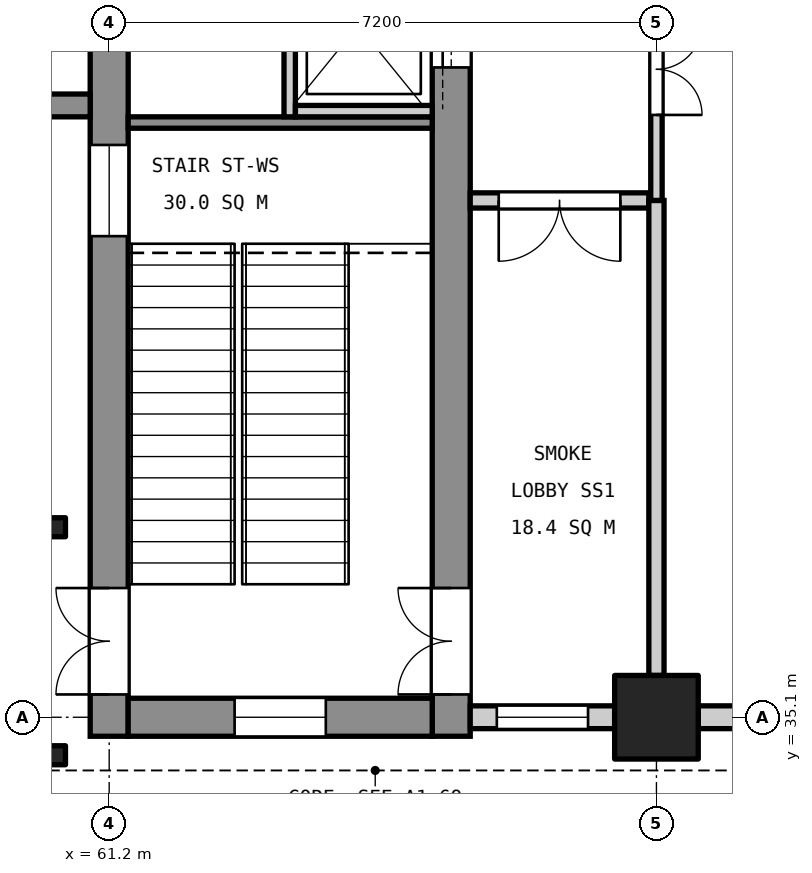
"""IFC4 building model, lengths in metres.
Left out: names, types, materials, properties, quantities, classifications, styles, units other than length and angle.
Written with IfcOpenShell. Run it as: python <this file> out.ifc"""

import sys

from ifc_helpers import new_model, si_unit, direction, frame, frame_2d, origin, origin_2d, place, context, subcontext, project, spatial, rectangle, i_section, extrude, element, fill, save


model = new_model("IFC4")
c1 = context("Model", 3, precision=1e-05, world=origin(), true_north=direction((0.0, 1.0)))
c2 = subcontext(c1, "Body", "Model", "MODEL_VIEW")
j1 = project(units=[si_unit("LENGTHUNIT", "METRE"), si_unit("PLANEANGLEUNIT", "RADIAN")], contexts=[c1])
p1 = place(None, origin())
s1 = spatial("IfcSite", under=j1, at=p1, CompositionType="ELEMENT")
p2 = place(p1, origin())
s2 = spatial("IfcBuilding", under=s1, at=p2, CompositionType="ELEMENT")
p3 = place(p2, origin())
s3 = spatial("IfcBuildingStorey", under=s2, at=p3, CompositionType="ELEMENT", Elevation=0.0)
p4 = place(p3, frame((68.4, 35.1, 0.0), z_axis=(0.0, 0.0, 1.0), x_axis=(1.0, 0.0, 0.0)))
e1 = element("IfcColumn", 1, at=p4, inside=s3, PredefinedType="COLUMN", context=c2, shape_type="SweptSolid", body=[
    extrude(rectangle(XDim=1.1, YDim=1.1, at=origin_2d()), origin(), (0.0, 0.0, 1.0), 6.0),
])
p5 = place(p3, frame((61.2, 34.85, 0.0), z_axis=(0.0, 0.0, 1.0), x_axis=(0.0, 1.0, 0.0)))
e2 = element("IfcWall", 2, at=p5, inside=s3, PredefinedType="SHEAR", context=c2, shape_type="SweptSolid", body=[
    extrude(rectangle(XDim=11.3, YDim=0.5, at=frame_2d((5.65, 0.0))), origin(), (0.0, 0.0, 1.0), 5.7),
])
p6 = place(p5, frame((0.55, 0.0, 0.0)))
e3 = element("IfcOpeningElement", 3, at=p6, cuts=e2, PredefinedType="OPENING", context=c2, shape_type="SweptSolid", body=[
    extrude(rectangle(XDim=1.4, YDim=2.1, at=frame_2d((0.7, 1.05))), frame((0.0, 0.26, 0.0), z_axis=(0.0, -1.0, 0.0), x_axis=(1.0, 0.0, 0.0)), (0.0, 0.0, 1.0), 0.52),
])
p7 = place(p5, frame((6.58, 0.0, 3.4)))
e4 = element("IfcOpeningElement", 4, at=p7, cuts=e2, PredefinedType="OPENING", context=c2, shape_type="SweptSolid", body=[
    extrude(rectangle(XDim=1.2, YDim=0.9, at=frame_2d((0.6, 0.45))), frame((0.0, 0.26, 0.0), z_axis=(0.0, -1.0, 0.0), x_axis=(1.0, 0.0, 0.0)), (0.0, 0.0, 1.0), 0.52),
])
p8 = place(p3, frame((65.7, 34.85, 0.0), z_axis=(0.0, 0.0, 1.0), x_axis=(0.0, 1.0, 0.0)))
e5 = element("IfcWall", 5, at=p8, inside=s3, PredefinedType="SHEAR", context=c2, shape_type="SweptSolid", body=[
    extrude(rectangle(XDim=11.3, YDim=0.5, at=frame_2d((5.65, 0.0))), origin(), (0.0, 0.0, 1.0), 5.7),
])
p9 = place(p8, frame((0.55, 0.0, 0.0)))
e6 = element("IfcOpeningElement", 6, at=p9, cuts=e5, PredefinedType="OPENING", context=c2, shape_type="SweptSolid", body=[
    extrude(rectangle(XDim=1.4, YDim=2.1, at=frame_2d((0.7, 1.05))), frame((0.0, 0.26, 0.0), z_axis=(0.0, -1.0, 0.0), x_axis=(1.0, 0.0, 0.0)), (0.0, 0.0, 1.0), 0.52),
])
p10 = place(p8, frame((8.8, 0.0, 0.0)))
e7 = element("IfcOpeningElement", 7, at=p10, cuts=e5, PredefinedType="OPENING", context=c2, shape_type="SweptSolid", body=[
    extrude(rectangle(XDim=1.1, YDim=2.1, at=frame_2d((0.55, 1.05))), frame((0.0, 0.26, 0.0), z_axis=(0.0, -1.0, 0.0), x_axis=(1.0, 0.0, 0.0)), (0.0, 0.0, 1.0), 0.52),
])
p11 = place(p3, frame((61.45, 35.1, 0.0), z_axis=(0.0, 0.0, 1.0), x_axis=(1.0, 0.0, 0.0)))
e8 = element("IfcWall", 8, at=p11, inside=s3, PredefinedType="SHEAR", context=c2, shape_type="SweptSolid", body=[
    extrude(rectangle(XDim=4.0, YDim=0.5, at=frame_2d((2.0, 0.0))), origin(), (0.0, 0.0, 1.0), 5.7),
])
p12 = place(p11, frame((1.4, 0.0, 3.4)))
e9 = element("IfcOpeningElement", 9, at=p12, cuts=e8, PredefinedType="OPENING", context=c2, shape_type="SweptSolid", body=[
    extrude(rectangle(XDim=1.2, YDim=0.9, at=frame_2d((0.6, 0.45))), frame((0.0, 0.26, 0.0), z_axis=(0.0, -1.0, 0.0), x_axis=(1.0, 0.0, 0.0)), (0.0, 0.0, 1.0), 0.52),
])
p13 = place(p3, frame((60.95, 43.15, 0.0), z_axis=(0.0, 0.0, 1.0), x_axis=(-1.0, 0.0, 0.0)))
e10 = element("IfcWall", 10, at=p13, inside=s3, PredefinedType="SHEAR", context=c2, shape_type="SweptSolid", body=[
    extrude(rectangle(XDim=1.25, YDim=0.3, at=frame_2d((0.625, 0.0))), origin(), (0.0, 0.0, 1.0), 6.0),
])
for number, where, z_axis, x_axis in (
    (11, (60.5, 34.6, 0.0), (0.0, 0.0, 1.0), (1.0, 0.0, 0.0)),
    (12, (60.5, 37.6, 0.0), (0.0, 0.0, 1.0), (1.0, 0.0, 0.0)),
):
    element("IfcColumn", number, at=place(p3, frame(where, z_axis=z_axis, x_axis=x_axis)), inside=s3, PredefinedType="COLUMN", context=c2, shape_type="SweptSolid", body=[
        extrude(i_section(OverallWidth=0.25, OverallDepth=0.25, WebThickness=0.009, FlangeThickness=0.014, FilletRadius=0.016, at=origin_2d()), origin(), (0.0, 0.0, 1.0), 4.8),
    ])
p14 = place(p3, frame((61.45, 42.925, 0.0), z_axis=(0.0, 0.0, 1.0), x_axis=(1.0, 0.0, 0.0)))
e13 = element("IfcWall", 13, at=p14, inside=s3, PredefinedType="SOLIDWALL", context=c2, shape_type="SweptSolid", body=[
    extrude(rectangle(XDim=4.0, YDim=0.15, at=frame_2d((2.0, 0.0))), origin(), (0.0, 0.0, 1.0), 5.7),
])
p15 = place(p3, frame((63.575, 43.0, 0.0), z_axis=(0.0, 0.0, 1.0), x_axis=(0.0, 1.0, 0.0)))
e14 = element("IfcWall", 14, at=p15, inside=s3, PredefinedType="SOLIDWALL", context=c2, shape_type="SweptSolid", body=[
    extrude(rectangle(XDim=2.65, YDim=0.15, at=frame_2d((1.325, 0.0))), origin(), (0.0, 0.0, 1.0), 6.0),
])
p16 = place(p3, frame((63.65, 43.075, 0.0), z_axis=(0.0, 0.0, 1.0), x_axis=(1.0, 0.0, 0.0)))
e15 = element("IfcWall", 15, at=p16, inside=s3, PredefinedType="SOLIDWALL", context=c2, shape_type="SweptSolid", body=[
    extrude(rectangle(XDim=1.8, YDim=0.15, at=frame_2d((0.9, 0.0))), origin(), (0.0, 0.0, 1.0), 6.0),
])
p17 = place(p3, frame((65.95, 35.1, 0.0), z_axis=(0.0, 0.0, 1.0), x_axis=(1.0, 0.0, 0.0)))
e16 = element("IfcWall", 16, at=p17, inside=s3, PredefinedType="STANDARD", context=c2, shape_type="SweptSolid", body=[
    extrude(rectangle(XDim=1.9, YDim=0.3, at=frame_2d((0.95, 0.0))), origin(), (0.0, 0.0, 1.0), 4.9),
])
p18 = place(p17, frame((0.35, 0.0, 0.9)))
e17 = element("IfcOpeningElement", 17, at=p18, cuts=e16, PredefinedType="OPENING", context=c2, shape_type="SweptSolid", body=[
    extrude(rectangle(XDim=1.2, YDim=2.4, at=frame_2d((0.6, 1.2))), frame((0.0, 0.16, 0.0), z_axis=(0.0, -1.0, 0.0), x_axis=(1.0, 0.0, 0.0)), (0.0, 0.0, 1.0), 0.32),
])
p19 = place(p3, frame((68.95, 35.1, 0.0), z_axis=(0.0, 0.0, 1.0), x_axis=(1.0, 0.0, 0.0)))
e18 = element("IfcWall", 18, at=p19, inside=s3, PredefinedType="STANDARD", context=c2, shape_type="SweptSolid", body=[
    extrude(rectangle(XDim=9.7, YDim=0.3, at=frame_2d((4.85, 0.0))), origin(), (0.0, 0.0, 1.0), 4.9),
])
p20 = place(p19, frame((0.625, 0.0, 0.9)))
e19 = element("IfcOpeningElement", 19, at=p20, cuts=e18, PredefinedType="OPENING", context=c2, shape_type="SweptSolid", body=[
    extrude(rectangle(XDim=1.8, YDim=3.0, at=frame_2d((0.9, 1.5))), frame((0.0, 0.16, 0.0), z_axis=(0.0, -1.0, 0.0), x_axis=(1.0, 0.0, 0.0)), (0.0, 0.0, 1.0), 0.32),
])
p21 = place(p19, frame((3.95, 0.0, 0.9)))
e20 = element("IfcOpeningElement", 20, at=p21, cuts=e18, PredefinedType="OPENING", context=c2, shape_type="SweptSolid", body=[
    extrude(rectangle(XDim=1.8, YDim=3.0, at=frame_2d((0.9, 1.5))), frame((0.0, 0.16, 0.0), z_axis=(0.0, -1.0, 0.0), x_axis=(1.0, 0.0, 0.0)), (0.0, 0.0, 1.0), 0.32),
])
p22 = place(p19, frame((7.275, 0.0, 0.9)))
e21 = element("IfcOpeningElement", 21, at=p22, cuts=e18, PredefinedType="OPENING", context=c2, shape_type="SweptSolid", body=[
    extrude(rectangle(XDim=1.8, YDim=3.0, at=frame_2d((0.9, 1.5))), frame((0.0, 0.16, 0.0), z_axis=(0.0, -1.0, 0.0), x_axis=(1.0, 0.0, 0.0)), (0.0, 0.0, 1.0), 0.32),
])
p23 = place(p3, frame((65.95, 41.9, 0.0), z_axis=(0.0, 0.0, 1.0), x_axis=(1.0, 0.0, 0.0)))
e22 = element("IfcWall", 22, at=p23, inside=s3, PredefinedType="PARTITIONING", context=c2, shape_type="SweptSolid", body=[
    extrude(rectangle(XDim=2.35, YDim=0.2, at=frame_2d((1.175, 0.0))), origin(), (0.0, 0.0, 1.0), 4.6),
])
p24 = place(p23, frame((0.375, 0.0, 0.0)))
e23 = element("IfcOpeningElement", 23, at=p24, cuts=e22, PredefinedType="OPENING", context=c2, shape_type="SweptSolid", body=[
    extrude(rectangle(XDim=1.6, YDim=2.1, at=frame_2d((0.8, 1.05))), frame((0.0, 0.11, 0.0), z_axis=(0.0, -1.0, 0.0), x_axis=(1.0, 0.0, 0.0)), (0.0, 0.0, 1.0), 0.22),
])
p25 = place(p3, frame((68.4, 35.65, 0.0), z_axis=(0.0, 0.0, 1.0), x_axis=(0.0, 1.0, 0.0)))
e24 = element("IfcWall", 24, at=p25, inside=s3, PredefinedType="PARTITIONING", context=c2, shape_type="SweptSolid", body=[
    extrude(rectangle(XDim=6.25, YDim=0.2, at=frame_2d((3.125, 0.0))), origin(), (0.0, 0.0, 1.0), 4.6),
])
p26 = place(p3, frame((68.4, 41.9, 0.0), z_axis=(0.0, 0.0, 1.0), x_axis=(0.0, 1.0, 0.0)))
e25 = element("IfcWall", 25, at=p26, inside=s3, PredefinedType="PARTITIONING", context=c2, shape_type="SweptSolid", body=[
    extrude(rectangle(XDim=3.45, YDim=0.15, at=frame_2d((1.725, 0.0))), origin(), (0.0, 0.0, 1.0), 4.6),
])
p27 = place(p26, frame((1.125, 0.0, 0.0)))
e26 = element("IfcOpeningElement", 26, at=p27, cuts=e25, PredefinedType="OPENING", context=c2, shape_type="SweptSolid", body=[
    extrude(rectangle(XDim=1.2, YDim=2.1, at=frame_2d((0.6, 1.05))), frame((0.0, 0.085, 0.0), z_axis=(0.0, -1.0, 0.0), x_axis=(1.0, 0.0, 0.0)), (0.0, 0.0, 1.0), 0.17),
])
p28 = place(p9, origin())
e27 = element("IfcDoor", 27, at=p28, inside=s3, OperationType="DOUBLE_DOOR_SINGLE_SWING", PredefinedType="DOOR", context=c2, shape_type="SweptSolid", body=[
    extrude(rectangle(XDim=1.4, YDim=2.1, at=frame_2d((0.7, 1.05))), frame((0.0, 0.025, 0.0), z_axis=(0.0, -1.0, 0.0), x_axis=(1.0, 0.0, 0.0)), (0.0, 0.0, 1.0), 0.05),
])
fill(e6, e27)
p29 = place(p6, origin())
e28 = element("IfcDoor", 28, at=p29, inside=s3, OperationType="DOUBLE_DOOR_SINGLE_SWING", PredefinedType="DOOR", context=c2, shape_type="SweptSolid", body=[
    extrude(rectangle(XDim=1.4, YDim=2.1, at=frame_2d((0.7, 1.05))), frame((0.0, 0.025, 0.0), z_axis=(0.0, -1.0, 0.0), x_axis=(1.0, 0.0, 0.0)), (0.0, 0.0, 1.0), 0.05),
])
fill(e3, e28)
p30 = place(p10, origin())
e29 = element("IfcDoor", 29, at=p30, inside=s3, OperationType="SLIDING_TO_LEFT", PredefinedType="DOOR", context=c2, shape_type="SweptSolid", body=[
    extrude(rectangle(XDim=1.1, YDim=2.1, at=frame_2d((0.55, 1.05))), frame((0.0, 0.025, 0.0), z_axis=(0.0, -1.0, 0.0), x_axis=(1.0, 0.0, 0.0)), (0.0, 0.0, 1.0), 0.05),
])
fill(e7, e29)
p31 = place(p18, origin())
e30 = element("IfcWindow", 30, at=p31, inside=s3, PartitioningType="SINGLE_PANEL", PredefinedType="WINDOW", context=c2, shape_type="SweptSolid", body=[
    extrude(rectangle(XDim=1.2, YDim=2.4, at=frame_2d((0.6, 1.2))), frame((0.0, 0.03, 0.0), z_axis=(0.0, -1.0, 0.0), x_axis=(1.0, 0.0, 0.0)), (0.0, 0.0, 1.0), 0.06),
])
fill(e17, e30)
p32 = place(p7, origin())
e31 = element("IfcWindow", 31, at=p32, inside=s3, PartitioningType="SINGLE_PANEL", PredefinedType="WINDOW", context=c2, shape_type="SweptSolid", body=[
    extrude(rectangle(XDim=1.2, YDim=0.9, at=frame_2d((0.6, 0.45))), frame((0.0, 0.03, 0.0), z_axis=(0.0, -1.0, 0.0), x_axis=(1.0, 0.0, 0.0)), (0.0, 0.0, 1.0), 0.06),
])
fill(e4, e31)
p33 = place(p12, origin())
e32 = element("IfcWindow", 32, at=p33, inside=s3, PartitioningType="SINGLE_PANEL", PredefinedType="WINDOW", context=c2, shape_type="SweptSolid", body=[
    extrude(rectangle(XDim=1.2, YDim=0.9, at=frame_2d((0.6, 0.45))), frame((0.0, 0.03, 0.0), z_axis=(0.0, -1.0, 0.0), x_axis=(1.0, 0.0, 0.0)), (0.0, 0.0, 1.0), 0.06),
])
fill(e9, e32)
p34 = place(p27, frame((1.2, 0.0, 0.0), z_axis=(0.0, 0.0, 1.0), x_axis=(-1.0, 0.0, 0.0)))
e33 = element("IfcDoor", 33, at=p34, inside=s3, OperationType="DOUBLE_DOOR_SINGLE_SWING", PredefinedType="DOOR", context=c2, shape_type="SweptSolid", body=[
    extrude(rectangle(XDim=1.2, YDim=2.1, at=frame_2d((0.6, 1.05))), frame((0.0, 0.025, 0.0), z_axis=(0.0, -1.0, 0.0), x_axis=(1.0, 0.0, 0.0)), (0.0, 0.0, 1.0), 0.05),
])
fill(e26, e33)
p35 = place(p24, frame((1.6, 0.0, 0.0), z_axis=(0.0, 0.0, 1.0), x_axis=(-1.0, 0.0, 0.0)))
e34 = element("IfcDoor", 34, at=p35, inside=s3, OperationType="DOUBLE_DOOR_SINGLE_SWING", PredefinedType="DOOR", context=c2, shape_type="SweptSolid", body=[
    extrude(rectangle(XDim=1.6, YDim=2.1, at=frame_2d((0.8, 1.05))), frame((0.0, 0.025, 0.0), z_axis=(0.0, -1.0, 0.0), x_axis=(1.0, 0.0, 0.0)), (0.0, 0.0, 1.0), 0.05),
])
fill(e23, e34)
save(model, sys.argv[1])
